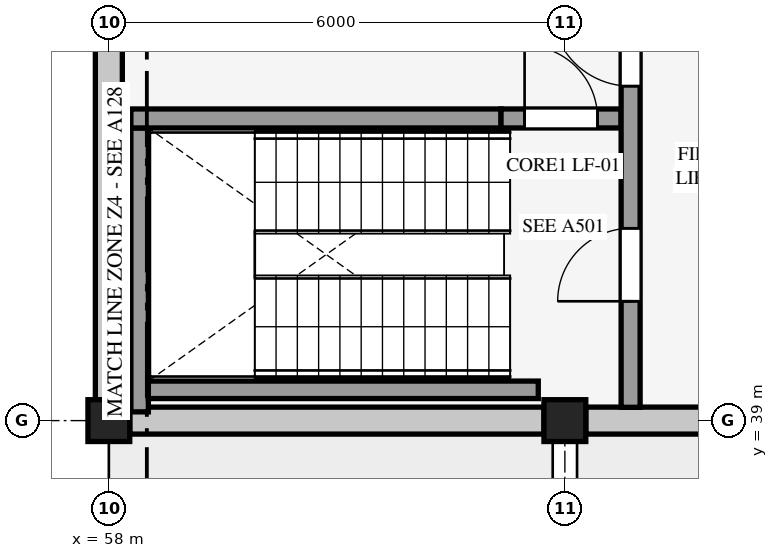
"""IFC4 building model, lengths in metres.
Left out: names, types, materials, properties, quantities, classifications, styles, units other than length and angle.
Written with IfcOpenShell. Run it as: python <this file> out.ifc"""

import sys

from ifc_helpers import new_model, si_unit, direction, frame, frame_2d, origin, origin_2d, place, context, subcontext, project, spatial, rectangle, extrude, element, fill, save


model = new_model("IFC4")
c1 = context("Model", 3, precision=1e-05, world=origin(), true_north=direction((0.0, 1.0)))
c2 = subcontext(c1, "Body", "Model", "MODEL_VIEW")
j1 = project(units=[si_unit("LENGTHUNIT", "METRE"), si_unit("PLANEANGLEUNIT", "RADIAN")], contexts=[c1])
p1 = place(None, origin())
s1 = spatial("IfcSite", under=j1, at=p1, CompositionType="ELEMENT")
p2 = place(p1, origin())
s2 = spatial("IfcBuilding", under=s1, at=p2, CompositionType="ELEMENT")
p3 = place(p2, frame((0.0, 0.0, 13.5)))
s3 = spatial("IfcBuildingStorey", under=s2, at=p3, CompositionType="ELEMENT", Elevation=13.5)
for number, where, z_axis, x_axis in (
    (1, (58.0, 39.0, 0.0), (0.0, 0.0, 1.0), (1.0, 0.0, 0.0)),
    (2, (64.0, 39.0, 0.0), (0.0, 0.0, 1.0), (1.0, 0.0, 0.0)),
):
    element("IfcColumn", number, at=place(p3, frame(where, z_axis=z_axis, x_axis=x_axis)), inside=s3, PredefinedType="COLUMN", context=c2, shape_type="SweptSolid", body=[
        extrude(rectangle(XDim=0.55, YDim=0.55, at=origin_2d()), origin(), (0.0, 0.0, 1.0), 4.5),
    ])
p4 = place(p3, frame((63.725, 39.0, 0.0), z_axis=(0.0, 0.0, 1.0), x_axis=(-1.0, 0.0, 0.0)))
e3 = element("IfcWall", 3, at=p4, inside=s3, PredefinedType="SOLIDWALL", context=c2, shape_type="SweptSolid", body=[
    extrude(rectangle(XDim=5.45, YDim=0.355, at=frame_2d((2.725, 0.0))), origin(), (0.0, 0.0, 1.0), 3.791),
])
p5 = place(p3, frame((69.725, 39.0, 0.0), z_axis=(0.0, 0.0, 1.0), x_axis=(-1.0, 0.0, 0.0)))
e4 = element("IfcWall", 4, at=p5, inside=s3, PredefinedType="SOLIDWALL", context=c2, shape_type="SweptSolid", body=[
    extrude(rectangle(XDim=5.45, YDim=0.355, at=frame_2d((2.725, 0.0))), origin(), (0.0, 0.0, 1.0), 3.741),
])
p6 = place(p3, frame((58.0, 39.275, 0.0), z_axis=(0.0, 0.0, 1.0), x_axis=(0.0, 1.0, 0.0)))
e5 = element("IfcWall", 5, at=p6, inside=s3, PredefinedType="SOLIDWALL", context=c2, shape_type="SweptSolid", body=[
    extrude(rectangle(XDim=5.45, YDim=0.355, at=frame_2d((2.725, 0.0))), origin(), (0.0, 0.0, 1.0), 3.797),
])
p7 = place(p3, frame((58.405, 39.115, 0.0), z_axis=(0.0, 0.0, 1.0), x_axis=(0.0, 1.0, 0.0)))
e6 = element("IfcWall", 6, at=p7, inside=s3, PredefinedType="SHEAR", context=c2, shape_type="SweptSolid", body=[
    extrude(rectangle(XDim=3.735, YDim=0.23, at=frame_2d((1.868, 0.0))), origin(), (0.0, 0.0, 1.0), 4.5),
])
p8 = place(p3, frame((58.52, 39.405, 0.0), z_axis=(0.0, 0.0, 1.0), x_axis=(1.0, 0.0, 0.0)))
e7 = element("IfcWall", 7, at=p8, inside=s3, PredefinedType="SHEAR", context=c2, shape_type="SweptSolid", body=[
    extrude(rectangle(XDim=5.13, YDim=0.23, at=frame_2d((2.565, 0.0))), origin(), (0.0, 0.0, 1.0), 4.5),
])
p9 = place(p3, frame((58.29, 42.975, 0.0), z_axis=(0.0, 0.0, 1.0), x_axis=(1.0, 0.0, 0.0)))
e8 = element("IfcWall", 8, at=p9, inside=s3, PredefinedType="SHEAR", context=c2, shape_type="SweptSolid", body=[
    extrude(rectangle(XDim=4.87, YDim=0.25, at=frame_2d((2.435, 0.0))), origin(), (0.0, 0.0, 1.0), 4.5),
])
p10 = place(p3, frame((63.16, 42.975, 0.0), z_axis=(0.0, 0.0, 1.0), x_axis=(1.0, 0.0, 0.0)))
e9 = element("IfcWall", 9, at=p10, inside=s3, PredefinedType="SHEAR", context=c2, shape_type="SweptSolid", body=[
    extrude(rectangle(XDim=1.58, YDim=0.25, at=frame_2d((0.79, 0.0))), origin(), (0.0, 0.0, 1.0), 4.204),
])
p11 = place(p10, frame((0.31, 0.0, 0.0)))
e10 = element("IfcOpeningElement", 10, at=p11, cuts=e9, PredefinedType="OPENING", context=c2, shape_type="SweptSolid", body=[
    extrude(rectangle(XDim=0.96, YDim=2.12, at=frame_2d((0.48, 1.06))), frame((0.0, 0.135, 0.0), z_axis=(0.0, -1.0, 0.0), x_axis=(1.0, 0.0, 0.0)), (0.0, 0.0, 1.0), 0.27),
])
p12 = place(p3, frame((64.865, 39.175, 0.0), z_axis=(0.0, 0.0, 1.0), x_axis=(0.0, 1.0, 0.0)))
e11 = element("IfcWall", 11, at=p12, inside=s3, PredefinedType="SHEAR", context=c2, shape_type="SweptSolid", body=[
    extrude(rectangle(XDim=5.675, YDim=0.25, at=frame_2d((2.837, 0.0))), origin(), (0.0, 0.0, 1.0), 4.204),
])
p13 = place(p12, frame((4.225, 0.0, 0.0)))
e12 = element("IfcOpeningElement", 12, at=p13, cuts=e11, PredefinedType="OPENING", context=c2, shape_type="SweptSolid", body=[
    extrude(rectangle(XDim=1.04, YDim=2.14, at=frame_2d((0.52, 1.07))), frame((0.0, 0.135, 0.0), z_axis=(0.0, -1.0, 0.0), x_axis=(1.0, 0.0, 0.0)), (0.0, 0.0, 1.0), 0.27),
])
p14 = place(p12, frame((1.395, 0.0, 0.0)))
e13 = element("IfcOpeningElement", 13, at=p14, cuts=e11, PredefinedType="OPENING", context=c2, shape_type="SweptSolid", body=[
    extrude(rectangle(XDim=0.96, YDim=2.12, at=frame_2d((0.48, 1.06))), frame((0.0, 0.135, 0.0), z_axis=(0.0, -1.0, 0.0), x_axis=(1.0, 0.0, 0.0)), (0.0, 0.0, 1.0), 0.27),
])
p15 = place(p11, origin())
e14 = element("IfcDoor", 14, at=p15, inside=s3, OperationType="SINGLE_SWING_LEFT", PredefinedType="DOOR", context=c2, shape_type="SweptSolid", body=[
    extrude(rectangle(XDim=0.96, YDim=2.12, at=frame_2d((0.48, 1.06))), frame((0.0, 0.025, 0.0), z_axis=(0.0, -1.0, 0.0), x_axis=(1.0, 0.0, 0.0)), (0.0, 0.0, 1.0), 0.05),
])
fill(e10, e14)
p16 = place(p13, origin())
e15 = element("IfcDoor", 15, at=p16, inside=s3, OperationType="SINGLE_SWING_RIGHT", PredefinedType="DOOR", context=c2, shape_type="SweptSolid", body=[
    extrude(rectangle(XDim=1.04, YDim=2.14, at=frame_2d((0.52, 1.07))), frame((0.0, 0.025, 0.0), z_axis=(0.0, -1.0, 0.0), x_axis=(1.0, 0.0, 0.0)), (0.0, 0.0, 1.0), 0.05),
])
fill(e12, e15)
p17 = place(p14, origin())
e16 = element("IfcDoor", 16, at=p17, inside=s3, OperationType="SINGLE_SWING_LEFT", PredefinedType="DOOR", context=c2, shape_type="SweptSolid", body=[
    extrude(rectangle(XDim=0.96, YDim=2.12, at=frame_2d((0.48, 1.06))), frame((0.0, 0.025, 0.0), z_axis=(0.0, -1.0, 0.0), x_axis=(1.0, 0.0, 0.0)), (0.0, 0.0, 1.0), 0.05),
])
fill(e13, e16)
save(model, sys.argv[1])
